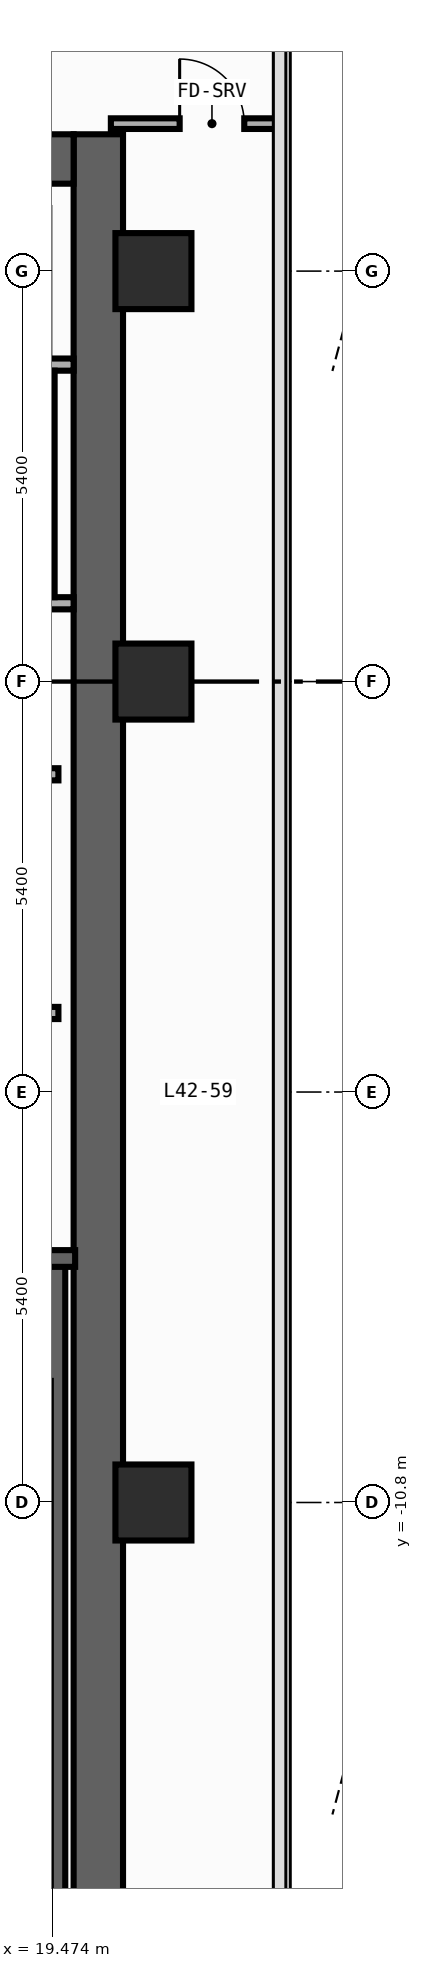
"""IFC4 building model, lengths in metres.
Left out: names, types, materials, properties, quantities, classifications, styles, units other than length and angle.
Written with IfcOpenShell. Run it as: python <this file> out.ifc"""

import sys

from ifc_helpers import new_model, si_unit, direction, frame, frame_2d, origin, origin_2d, place, context, subcontext, project, spatial, rectangle, extrude, element, fill, save


model = new_model("IFC4")
c1 = context("Model", 3, precision=1e-05, world=origin(), true_north=direction((0.0, 1.0)))
c2 = subcontext(c1, "Body", "Model", "MODEL_VIEW")
j1 = project(units=[si_unit("LENGTHUNIT", "METRE"), si_unit("PLANEANGLEUNIT", "RADIAN")], contexts=[c1])
p1 = place(None, origin())
s1 = spatial("IfcSite", under=j1, at=p1, CompositionType="ELEMENT")
p2 = place(p1, origin())
s2 = spatial("IfcBuilding", under=s1, at=p2, CompositionType="ELEMENT")
p3 = place(p2, frame((0.0, 0.0, 184.0)))
s3 = spatial("IfcBuildingStorey", under=s2, at=p3, CompositionType="ELEMENT", Elevation=184.0)
p4 = place(p3, frame((20.075, -19.8, 0.0), z_axis=(0.0, 0.0, 1.0), x_axis=(0.0, 1.0, 0.0)))
e1 = element("IfcWall", 1, at=p4, inside=s3, PredefinedType="SHEAR", context=c2, shape_type="SweptSolid", body=[
    extrude(rectangle(XDim=27.0, YDim=0.65, at=frame_2d((13.5, 0.0))), origin(), (0.0, 0.0, 1.0), 3.54),
])
p5 = place(p3, frame((12.65, 6.875, 0.0), z_axis=(0.0, 0.0, 1.0), x_axis=(1.0, 0.0, 0.0)))
e2 = element("IfcWall", 2, at=p5, inside=s3, PredefinedType="SHEAR", context=c2, shape_type="SweptSolid", body=[
    extrude(rectangle(XDim=7.1, YDim=0.65, at=frame_2d((3.55, 0.0))), origin(), (0.0, 0.0, 1.0), 3.54),
])
p6 = place(p3, frame((19.53, -19.01, 0.0), z_axis=(0.0, 0.0, 1.0), x_axis=(0.0, 1.0, 0.0)))
e3 = element("IfcWall", 3, at=p6, inside=s3, PredefinedType="SHEAR", context=c2, shape_type="SweptSolid", body=[
    extrude(rectangle(XDim=11.42, YDim=0.22, at=frame_2d((5.71, 0.0))), origin(), (0.0, 0.0, 1.0), 3.54),
])
p7 = place(p3, frame((19.77, -7.59, 0.0), z_axis=(0.0, 0.0, 1.0), x_axis=(-1.0, 0.0, 0.0)))
e4 = element("IfcWall", 4, at=p7, inside=s3, PredefinedType="SHEAR", context=c2, shape_type="SweptSolid", body=[
    extrude(rectangle(XDim=4.065, YDim=0.22, at=frame_2d((2.032, 0.0))), origin(), (0.0, 0.0, 1.0), 3.54),
])
p8 = place(p7, frame((1.08, 0.0, 0.0)))
e5 = element("IfcOpeningElement", 5, at=p8, cuts=e4, PredefinedType="OPENING", context=c2, shape_type="SweptSolid", body=[
    extrude(rectangle(XDim=1.1, YDim=2.2, at=frame_2d((0.55, 1.1))), frame((0.0, 0.12, 0.0), z_axis=(0.0, -1.0, 0.0), x_axis=(1.0, 0.0, 0.0)), (0.0, 0.0, 1.0), 0.24),
])
for number, where, z_axis, x_axis in (
    (6, (20.8, -10.8, 0.0), (0.0, 0.0, 1.0), (1.0, 0.0, 0.0)),
    (7, (20.8, 0.0, 0.0), (0.0, 0.0, 1.0), (1.0, 0.0, 0.0)),
    (8, (20.8, 5.4, 0.0), (0.0, 0.0, 1.0), (1.0, 0.0, 0.0)),
):
    element("IfcColumn", number, at=place(p3, frame(where, z_axis=z_axis, x_axis=x_axis)), inside=s3, PredefinedType="COLUMN", context=c2, shape_type="SweptSolid", body=[
        extrude(rectangle(XDim=1.0, YDim=1.0, at=origin_2d()), origin(), (0.0, 0.0, 1.0), 3.8),
    ])
p9 = place(p3, frame((15.75, -4.36, 0.0), z_axis=(0.0, 0.0, 1.0), x_axis=(1.0, 0.0, 0.0)))
e9 = element("IfcWall", 9, at=p9, inside=s3, PredefinedType="STANDARD", context=c2, shape_type="SweptSolid", body=[
    extrude(rectangle(XDim=3.8, YDim=0.16, at=frame_2d((1.9, 0.0))), origin(), (0.0, 0.0, 1.0), 3.54),
])
p10 = place(p9, frame((1.47, 0.0, 0.0)))
e10 = element("IfcOpeningElement", 10, at=p10, cuts=e9, PredefinedType="OPENING", context=c2, shape_type="SweptSolid", body=[
    extrude(rectangle(XDim=1.15, YDim=2.2, at=frame_2d((0.575, 1.1))), frame((0.0, 0.09, 0.0), z_axis=(0.0, -1.0, 0.0), x_axis=(1.0, 0.0, 0.0)), (0.0, 0.0, 1.0), 0.18),
])
p11 = place(p3, frame((15.75, -1.22, 0.0), z_axis=(0.0, 0.0, 1.0), x_axis=(1.0, 0.0, 0.0)))
e11 = element("IfcWall", 11, at=p11, inside=s3, PredefinedType="STANDARD", context=c2, shape_type="SweptSolid", body=[
    extrude(rectangle(XDim=3.8, YDim=0.16, at=frame_2d((1.9, 0.0))), origin(), (0.0, 0.0, 1.0), 3.54),
])
for number, where, z_axis, x_axis in (
    (12, (17.31, 4.17, 0.0), (0.0, 0.0, 1.0), (1.0, 0.0, 0.0)),
    (13, (17.31, 1.03, 0.0), (0.0, 0.0, 1.0), (1.0, 0.0, 0.0)),
):
    element("IfcWall", number, at=place(p3, frame(where, z_axis=z_axis, x_axis=x_axis)), inside=s3, PredefinedType="PARTITIONING", context=c2, shape_type="SweptSolid", body=[
        extrude(rectangle(XDim=2.44, YDim=0.16, at=frame_2d((1.22, 0.0))), origin(), (0.0, 0.0, 1.0), 3.54),
    ])
p12 = place(p3, frame((20.24, 7.34, 0.0), z_axis=(0.0, 0.0, 1.0), x_axis=(1.0, 0.0, 0.0)))
e14 = element("IfcWall", 14, at=p12, inside=s3, PredefinedType="PARTITIONING", context=c2, shape_type="SweptSolid", body=[
    extrude(rectangle(XDim=2.215, YDim=0.14, at=frame_2d((1.107, 0.0))), origin(), (0.0, 0.0, 1.0), 3.54),
])
p13 = place(p12, frame((0.905, 0.0, 0.0)))
e15 = element("IfcOpeningElement", 15, at=p13, cuts=e14, PredefinedType="OPENING", context=c2, shape_type="SweptSolid", body=[
    extrude(rectangle(XDim=0.85, YDim=2.1, at=frame_2d((0.425, 1.05))), frame((0.0, 0.08, 0.0), z_axis=(0.0, -1.0, 0.0), x_axis=(1.0, 0.0, 0.0)), (0.0, 0.0, 1.0), 0.16),
])
p14 = place(p3, frame((19.45, 4.09, 0.0), z_axis=(0.0, 0.0, 1.0), x_axis=(0.0, -1.0, 0.0)))
e16 = element("IfcWall", 16, at=p14, inside=s3, PredefinedType="PARTITIONING", context=c2, shape_type="SweptSolid", body=[
    extrude(rectangle(XDim=2.98, YDim=0.1, at=frame_2d((1.49, 0.0))), origin(), (0.0, 0.0, 1.0), 3.54),
])
p15 = place(p13, origin())
e17 = element("IfcDoor", 17, at=p15, inside=s3, OperationType="SINGLE_SWING_LEFT", PredefinedType="DOOR", context=c2, shape_type="SweptSolid", body=[
    extrude(rectangle(XDim=0.85, YDim=2.1, at=frame_2d((0.425, 1.05))), frame((0.0, 0.025, 0.0), z_axis=(0.0, -1.0, 0.0), x_axis=(1.0, 0.0, 0.0)), (0.0, 0.0, 1.0), 0.05),
])
fill(e15, e17)
save(model, sys.argv[1])
